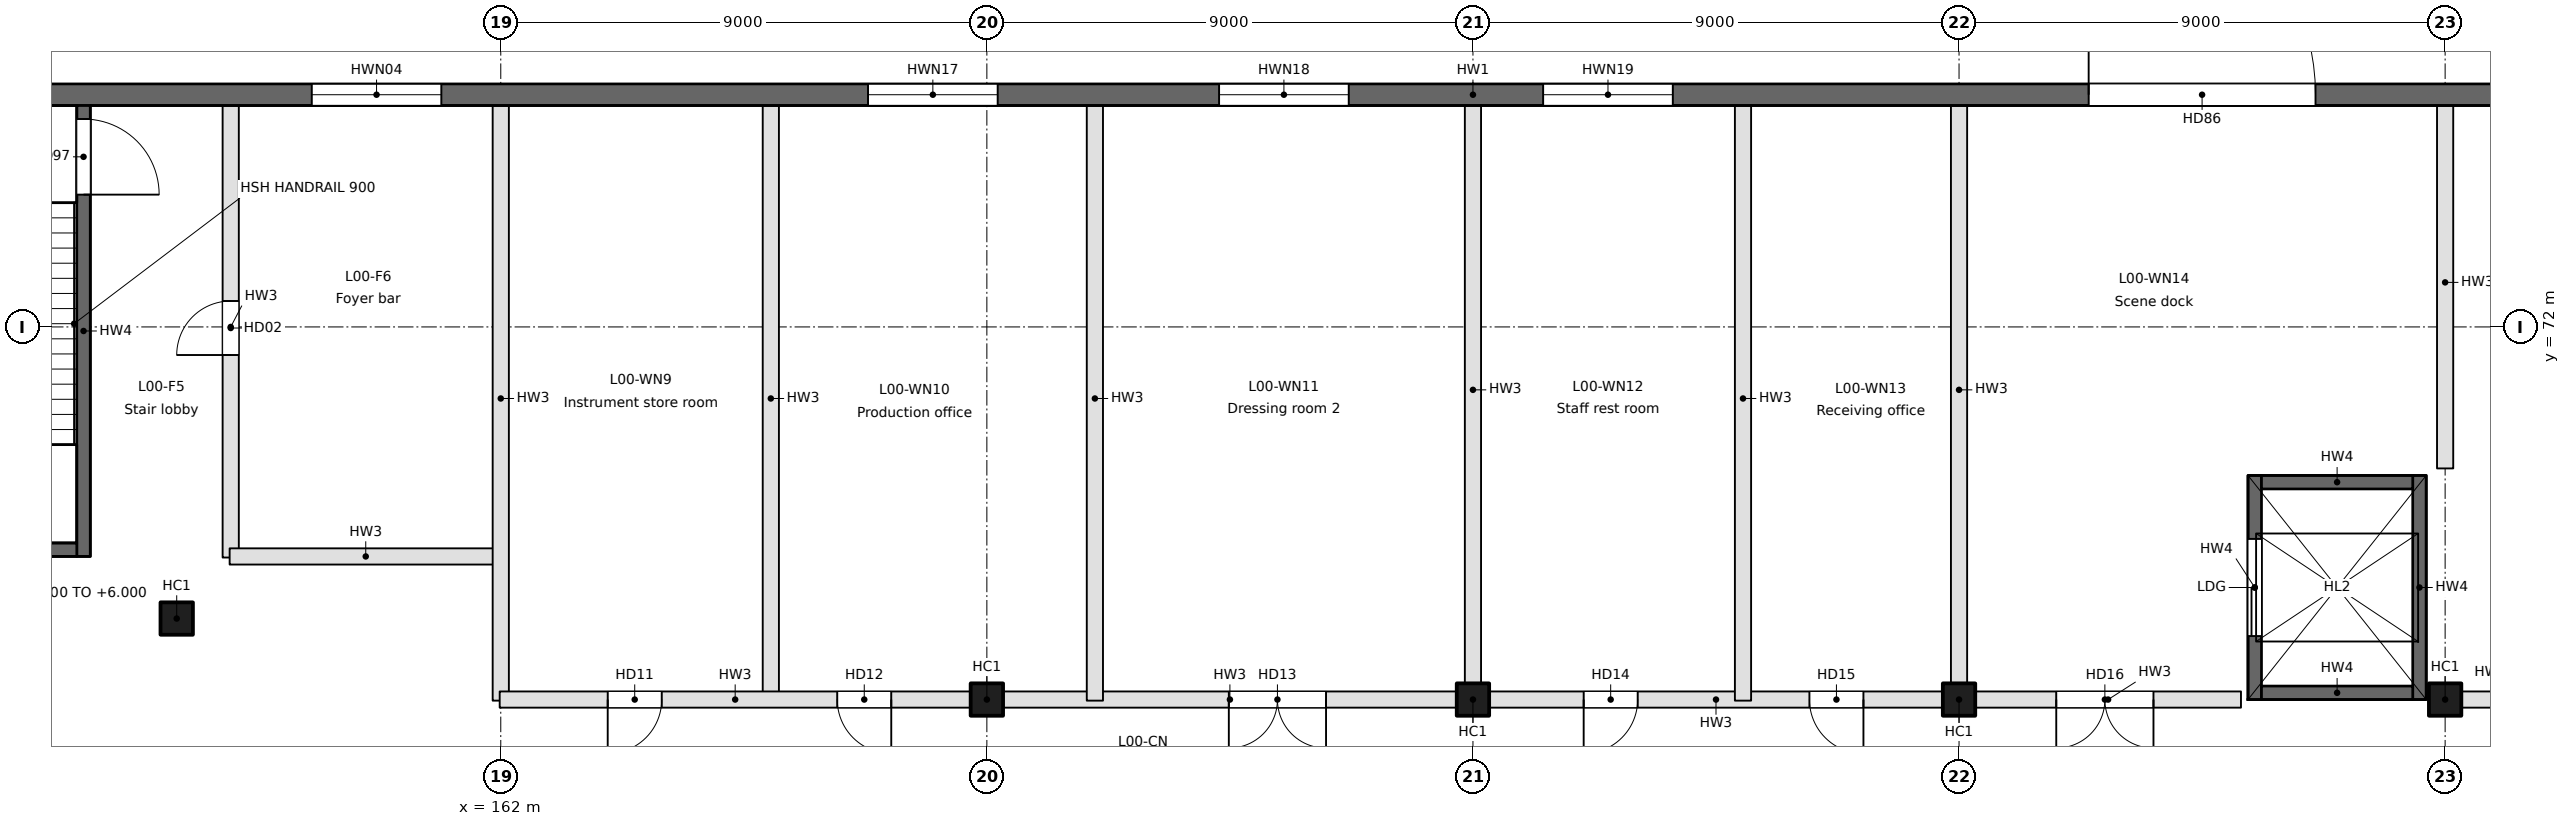
"""IFC4 building model, lengths in metres.
Left out: names, types, materials, properties, quantities, classifications, styles, units other than length and angle.
Written with IfcOpenShell. Run it as: python <this file> out.ifc"""

import sys

from ifc_helpers import new_model, si_unit, direction, frame, frame_2d, origin, origin_2d, place, context, subcontext, project, spatial, rectangle, extrude, element, fill, save


model = new_model("IFC4")
c1 = context("Model", 3, precision=1e-05, world=origin(), true_north=direction((0.0, 1.0)))
c2 = subcontext(c1, "Body", "Model", "MODEL_VIEW")
j1 = project(units=[si_unit("LENGTHUNIT", "METRE"), si_unit("PLANEANGLEUNIT", "RADIAN")], contexts=[c1])
p1 = place(None, origin())
s1 = spatial("IfcSite", under=j1, at=p1, CompositionType="ELEMENT")
p2 = place(p1, origin())
s2 = spatial("IfcBuilding", under=s1, at=p2, CompositionType="ELEMENT")
p3 = place(p2, origin())
s3 = spatial("IfcBuildingStorey", under=s2, at=p3, CompositionType="ELEMENT", Elevation=0.0)
for number, where, z_axis, x_axis in (
    (1, (171.0, 65.1, -1.8), (0.0, 0.0, 1.0), (1.0, 0.0, 0.0)),
    (2, (180.0, 65.1, -1.8), (0.0, 0.0, 1.0), (1.0, 0.0, 0.0)),
    (3, (189.0, 65.1, -1.8), (0.0, 0.0, 1.0), (1.0, 0.0, 0.0)),
    (4, (198.0, 65.1, -1.8), (0.0, 0.0, 1.0), (1.0, 0.0, 0.0)),
    (5, (156.0, 66.6, -1.8), (0.0, 0.0, 1.0), (1.0, 0.0, 0.0)),
):
    element("IfcColumn", number, at=place(p3, frame(where, z_axis=z_axis, x_axis=x_axis)), inside=s3, PredefinedType="COLUMN", context=c2, shape_type="SweptSolid", body=[
        extrude(rectangle(XDim=0.6, YDim=0.6, at=origin_2d()), origin(), (0.0, 0.0, 1.0), 7.8),
    ])
p4 = place(p3, frame((150.4, 76.3, -1.8), z_axis=(0.0, 0.0, 1.0), x_axis=(1.0, 0.0, 0.0)))
e6 = element("IfcWall", 6, at=p4, inside=s3, PredefinedType="SOLIDWALL", context=c2, shape_type="SweptSolid", body=[
    extrude(rectangle(XDim=59.2, YDim=0.4, at=frame_2d((29.6, 0.0))), origin(), (0.0, 0.0, 1.0), 7.45),
])
p5 = place(p4, frame((0.875, 0.0, 1.8)))
e7 = element("IfcOpeningElement", 7, at=p5, cuts=e6, PredefinedType="OPENING", context=c2, shape_type="SweptSolid", body=[
    extrude(rectangle(XDim=2.0, YDim=2.1, at=frame_2d((1.0, 1.05))), frame((0.0, 0.2, 0.0), z_axis=(0.0, -1.0, 0.0), x_axis=(1.0, 0.0, 0.0)), (0.0, 0.0, 1.0), 0.4),
])
p6 = place(p4, frame((41.0, 0.0, 1.8)))
e8 = element("IfcOpeningElement", 8, at=p6, cuts=e6, PredefinedType="OPENING", context=c2, shape_type="SweptSolid", body=[
    extrude(rectangle(XDim=4.2, YDim=4.2, at=frame_2d((2.1, 2.1))), frame((0.0, 0.2, 0.0), z_axis=(0.0, -1.0, 0.0), x_axis=(1.0, 0.0, 0.0)), (0.0, 0.0, 1.0), 0.4),
])
p7 = place(p4, frame((52.9, 0.0, 1.8)))
e9 = element("IfcOpeningElement", 9, at=p7, cuts=e6, PredefinedType="OPENING", context=c2, shape_type="SweptSolid", body=[
    extrude(rectangle(XDim=1.4, YDim=2.1, at=frame_2d((0.7, 1.05))), frame((0.0, 0.2, 0.0), z_axis=(0.0, -1.0, 0.0), x_axis=(1.0, 0.0, 0.0)), (0.0, 0.0, 1.0), 0.4),
])
p8 = place(p4, frame((8.1, 0.0, 2.7)))
e10 = element("IfcOpeningElement", 10, at=p8, cuts=e6, PredefinedType="OPENING", context=c2, shape_type="SweptSolid", body=[
    extrude(rectangle(XDim=2.4, YDim=1.8, at=frame_2d((1.2, 0.9))), frame((0.0, 0.2, 0.0), z_axis=(0.0, -1.0, 0.0), x_axis=(1.0, 0.0, 0.0)), (0.0, 0.0, 1.0), 0.4),
])
p9 = place(p4, frame((18.4, 0.0, 2.7)))
e11 = element("IfcOpeningElement", 11, at=p9, cuts=e6, PredefinedType="OPENING", context=c2, shape_type="SweptSolid", body=[
    extrude(rectangle(XDim=2.4, YDim=1.8, at=frame_2d((1.2, 0.9))), frame((0.0, 0.2, 0.0), z_axis=(0.0, -1.0, 0.0), x_axis=(1.0, 0.0, 0.0)), (0.0, 0.0, 1.0), 0.4),
])
p10 = place(p4, frame((24.9, 0.0, 2.7)))
e12 = element("IfcOpeningElement", 12, at=p10, cuts=e6, PredefinedType="OPENING", context=c2, shape_type="SweptSolid", body=[
    extrude(rectangle(XDim=2.4, YDim=1.8, at=frame_2d((1.2, 0.9))), frame((0.0, 0.2, 0.0), z_axis=(0.0, -1.0, 0.0), x_axis=(1.0, 0.0, 0.0)), (0.0, 0.0, 1.0), 0.4),
])
p11 = place(p4, frame((30.9, 0.0, 2.7)))
e13 = element("IfcOpeningElement", 13, at=p11, cuts=e6, PredefinedType="OPENING", context=c2, shape_type="SweptSolid", body=[
    extrude(rectangle(XDim=2.4, YDim=1.8, at=frame_2d((1.2, 0.9))), frame((0.0, 0.2, 0.0), z_axis=(0.0, -1.0, 0.0), x_axis=(1.0, 0.0, 0.0)), (0.0, 0.0, 1.0), 0.4),
])
p12 = place(p3, frame((157.0, 67.73, 0.0), z_axis=(0.0, 0.0, 1.0), x_axis=(0.0, 1.0, 0.0)))
e14 = element("IfcWall", 14, at=p12, inside=s3, PredefinedType="PARTITIONING", context=c2, shape_type="SweptSolid", body=[
    extrude(rectangle(XDim=8.54, YDim=0.3, at=frame_2d((4.27, 0.0))), origin(), (0.0, 0.0, 1.0), 5.65),
])
p13 = place(p12, frame((3.75, 0.0, 0.0)))
e15 = element("IfcOpeningElement", 15, at=p13, cuts=e14, PredefinedType="OPENING", context=c2, shape_type="SweptSolid", body=[
    extrude(rectangle(XDim=1.0, YDim=2.1, at=frame_2d((0.5, 1.05))), frame((0.0, 0.15, 0.0), z_axis=(0.0, -1.0, 0.0), x_axis=(1.0, 0.0, 0.0)), (0.0, 0.0, 1.0), 0.3),
])
p14 = place(p3, frame((162.02, 67.75, 0.0), z_axis=(0.0, 0.0, 1.0), x_axis=(-1.0, 0.0, 0.0)))
e16 = element("IfcWall", 16, at=p14, inside=s3, PredefinedType="PARTITIONING", context=c2, shape_type="SweptSolid", body=[
    extrude(rectangle(XDim=5.04, YDim=0.3, at=frame_2d((2.52, 0.0))), origin(), (0.0, 0.0, 1.0), 5.65),
])
p15 = place(p3, frame((162.0, 65.08, 0.0), z_axis=(0.0, 0.0, 1.0), x_axis=(0.0, 1.0, 0.0)))
e17 = element("IfcWall", 17, at=p15, inside=s3, PredefinedType="PARTITIONING", context=c2, shape_type="SweptSolid", body=[
    extrude(rectangle(XDim=11.19, YDim=0.3, at=frame_2d((5.595, 0.0))), origin(), (0.0, 0.0, 1.0), 5.65),
])
p16 = place(p3, frame((198.0, 69.38, 0.0), z_axis=(0.0, 0.0, 1.0), x_axis=(0.0, 1.0, 0.0)))
e18 = element("IfcWall", 18, at=p16, inside=s3, PredefinedType="PARTITIONING", context=c2, shape_type="SweptSolid", body=[
    extrude(rectangle(XDim=6.89, YDim=0.3, at=frame_2d((3.445, 0.0))), origin(), (0.0, 0.0, 1.0), 5.65),
])
p17 = place(p3, frame((167.0, 65.08, 0.0), z_axis=(0.0, 0.0, 1.0), x_axis=(0.0, 1.0, 0.0)))
e19 = element("IfcWall", 19, at=p17, inside=s3, PredefinedType="PARTITIONING", context=c2, shape_type="SweptSolid", body=[
    extrude(rectangle(XDim=11.19, YDim=0.3, at=frame_2d((5.595, 0.0))), origin(), (0.0, 0.0, 1.0), 5.65),
])
p18 = place(p3, frame((170.7, 65.1, 0.0), z_axis=(0.0, 0.0, 1.0), x_axis=(-1.0, 0.0, 0.0)))
e20 = element("IfcWall", 20, at=p18, inside=s3, PredefinedType="PARTITIONING", context=c2, shape_type="SweptSolid", body=[
    extrude(rectangle(XDim=8.72, YDim=0.3, at=frame_2d((4.36, 0.0))), origin(), (0.0, 0.0, 1.0), 5.65),
])
p19 = place(p18, frame((5.72, 0.0, 0.0)))
e21 = element("IfcOpeningElement", 21, at=p19, cuts=e20, PredefinedType="OPENING", context=c2, shape_type="SweptSolid", body=[
    extrude(rectangle(XDim=1.0, YDim=2.1, at=frame_2d((0.5, 1.05))), frame((0.0, 0.15, 0.0), z_axis=(0.0, -1.0, 0.0), x_axis=(1.0, 0.0, 0.0)), (0.0, 0.0, 1.0), 0.3),
])
p20 = place(p18, frame((1.47, 0.0, 0.0)))
e22 = element("IfcOpeningElement", 22, at=p20, cuts=e20, PredefinedType="OPENING", context=c2, shape_type="SweptSolid", body=[
    extrude(rectangle(XDim=1.0, YDim=2.1, at=frame_2d((0.5, 1.05))), frame((0.0, 0.15, 0.0), z_axis=(0.0, -1.0, 0.0), x_axis=(1.0, 0.0, 0.0)), (0.0, 0.0, 1.0), 0.3),
])
p21 = place(p3, frame((179.7, 65.1, 0.0), z_axis=(0.0, 0.0, 1.0), x_axis=(-1.0, 0.0, 0.0)))
e23 = element("IfcWall", 23, at=p21, inside=s3, PredefinedType="PARTITIONING", context=c2, shape_type="SweptSolid", body=[
    extrude(rectangle(XDim=8.4, YDim=0.3, at=frame_2d((4.2, 0.0))), origin(), (0.0, 0.0, 1.0), 5.65),
])
p22 = place(p21, frame((2.42, 0.0, 0.0)))
e24 = element("IfcOpeningElement", 24, at=p22, cuts=e23, PredefinedType="OPENING", context=c2, shape_type="SweptSolid", body=[
    extrude(rectangle(XDim=1.8, YDim=2.1, at=frame_2d((0.9, 1.05))), frame((0.0, 0.15, 0.0), z_axis=(0.0, -1.0, 0.0), x_axis=(1.0, 0.0, 0.0)), (0.0, 0.0, 1.0), 0.3),
])
p23 = place(p3, frame((188.7, 65.1, 0.0), z_axis=(0.0, 0.0, 1.0), x_axis=(-1.0, 0.0, 0.0)))
e25 = element("IfcWall", 25, at=p23, inside=s3, PredefinedType="PARTITIONING", context=c2, shape_type="SweptSolid", body=[
    extrude(rectangle(XDim=8.4, YDim=0.3, at=frame_2d((4.2, 0.0))), origin(), (0.0, 0.0, 1.0), 5.65),
])
p24 = place(p23, frame((5.65, 0.0, 0.0)))
e26 = element("IfcOpeningElement", 26, at=p24, cuts=e25, PredefinedType="OPENING", context=c2, shape_type="SweptSolid", body=[
    extrude(rectangle(XDim=1.0, YDim=2.1, at=frame_2d((0.5, 1.05))), frame((0.0, 0.15, 0.0), z_axis=(0.0, -1.0, 0.0), x_axis=(1.0, 0.0, 0.0)), (0.0, 0.0, 1.0), 0.3),
])
p25 = place(p23, frame((1.47, 0.0, 0.0)))
e27 = element("IfcOpeningElement", 27, at=p25, cuts=e25, PredefinedType="OPENING", context=c2, shape_type="SweptSolid", body=[
    extrude(rectangle(XDim=1.0, YDim=2.1, at=frame_2d((0.5, 1.05))), frame((0.0, 0.15, 0.0), z_axis=(0.0, -1.0, 0.0), x_axis=(1.0, 0.0, 0.0)), (0.0, 0.0, 1.0), 0.3),
])
p26 = place(p3, frame((194.22, 65.1, 0.0), z_axis=(0.0, 0.0, 1.0), x_axis=(-1.0, 0.0, 0.0)))
e28 = element("IfcWall", 28, at=p26, inside=s3, PredefinedType="PARTITIONING", context=c2, shape_type="SweptSolid", body=[
    extrude(rectangle(XDim=4.92, YDim=0.3, at=frame_2d((2.46, 0.0))), origin(), (0.0, 0.0, 1.0), 5.65),
])
p27 = place(p26, frame((1.62, 0.0, 0.0)))
e29 = element("IfcOpeningElement", 29, at=p27, cuts=e28, PredefinedType="OPENING", context=c2, shape_type="SweptSolid", body=[
    extrude(rectangle(XDim=1.8, YDim=2.1, at=frame_2d((0.9, 1.05))), frame((0.0, 0.15, 0.0), z_axis=(0.0, -1.0, 0.0), x_axis=(1.0, 0.0, 0.0)), (0.0, 0.0, 1.0), 0.3),
])
p28 = place(p3, frame((201.12, 65.1, 0.0), z_axis=(0.0, 0.0, 1.0), x_axis=(-1.0, 0.0, 0.0)))
e30 = element("IfcWall", 30, at=p28, inside=s3, PredefinedType="PARTITIONING", context=c2, shape_type="SweptSolid", body=[
    extrude(rectangle(XDim=2.82, YDim=0.3, at=frame_2d((1.41, 0.0))), origin(), (0.0, 0.0, 1.0), 5.65),
])
p29 = place(p28, frame((0.82, 0.0, 0.0)))
e31 = element("IfcOpeningElement", 31, at=p29, cuts=e30, PredefinedType="OPENING", context=c2, shape_type="SweptSolid", body=[
    extrude(rectangle(XDim=1.0, YDim=2.1, at=frame_2d((0.5, 1.05))), frame((0.0, 0.15, 0.0), z_axis=(0.0, -1.0, 0.0), x_axis=(1.0, 0.0, 0.0)), (0.0, 0.0, 1.0), 0.3),
])
p30 = place(p3, frame((173.0, 65.08, 0.0), z_axis=(0.0, 0.0, 1.0), x_axis=(0.0, 1.0, 0.0)))
e32 = element("IfcWall", 32, at=p30, inside=s3, PredefinedType="PARTITIONING", context=c2, shape_type="SweptSolid", body=[
    extrude(rectangle(XDim=11.19, YDim=0.3, at=frame_2d((5.595, 0.0))), origin(), (0.0, 0.0, 1.0), 5.65),
])
p31 = place(p3, frame((180.0, 65.4, 0.0), z_axis=(0.0, 0.0, 1.0), x_axis=(0.0, 1.0, 0.0)))
e33 = element("IfcWall", 33, at=p31, inside=s3, PredefinedType="PARTITIONING", context=c2, shape_type="SweptSolid", body=[
    extrude(rectangle(XDim=10.87, YDim=0.3, at=frame_2d((5.435, 0.0))), origin(), (0.0, 0.0, 1.0), 5.65),
])
p32 = place(p3, frame((185.0, 65.08, 0.0), z_axis=(0.0, 0.0, 1.0), x_axis=(0.0, 1.0, 0.0)))
e34 = element("IfcWall", 34, at=p32, inside=s3, PredefinedType="PARTITIONING", context=c2, shape_type="SweptSolid", body=[
    extrude(rectangle(XDim=11.19, YDim=0.3, at=frame_2d((5.595, 0.0))), origin(), (0.0, 0.0, 1.0), 5.65),
])
p33 = place(p3, frame((189.0, 65.4, 0.0), z_axis=(0.0, 0.0, 1.0), x_axis=(0.0, 1.0, 0.0)))
e35 = element("IfcWall", 35, at=p33, inside=s3, PredefinedType="PARTITIONING", context=c2, shape_type="SweptSolid", body=[
    extrude(rectangle(XDim=10.87, YDim=0.3, at=frame_2d((5.435, 0.0))), origin(), (0.0, 0.0, 1.0), 5.65),
])
p34 = place(p3, frame((154.275, 76.1, -1.8), z_axis=(0.0, 0.0, 1.0), x_axis=(0.0, -1.0, 0.0)))
e36 = element("IfcWall", 36, at=p34, inside=s3, PredefinedType="SOLIDWALL", context=c2, shape_type="SweptSolid", body=[
    extrude(rectangle(XDim=8.35, YDim=0.25, at=frame_2d((4.175, 0.0))), origin(), (0.0, 0.0, 1.0), 7.45),
])
p35 = place(p34, frame((0.25, 0.0, 1.8)))
e37 = element("IfcOpeningElement", 37, at=p35, cuts=e36, PredefinedType="OPENING", context=c2, shape_type="SweptSolid", body=[
    extrude(rectangle(XDim=1.4, YDim=2.1, at=frame_2d((0.7, 1.05))), frame((0.0, 0.125, 0.0), z_axis=(0.0, -1.0, 0.0), x_axis=(1.0, 0.0, 0.0)), (0.0, 0.0, 1.0), 0.25),
])
p36 = place(p3, frame((154.15, 67.875, -1.8), z_axis=(0.0, 0.0, 1.0), x_axis=(-1.0, 0.0, 0.0)))
e38 = element("IfcWall", 38, at=p36, inside=s3, PredefinedType="SOLIDWALL", context=c2, shape_type="SweptSolid", body=[
    extrude(rectangle(XDim=3.75, YDim=0.25, at=frame_2d((1.875, 0.0))), origin(), (0.0, 0.0, 1.0), 7.45),
])
p37 = place(p3, frame((194.475, 65.1, -1.8), z_axis=(0.0, 0.0, 1.0), x_axis=(0.0, 1.0, 0.0)))
e39 = element("IfcWall", 39, at=p37, inside=s3, PredefinedType="SOLIDWALL", context=c2, shape_type="SweptSolid", body=[
    extrude(rectangle(XDim=4.15, YDim=0.25, at=frame_2d((2.075, 0.0))), origin(), (0.0, 0.0, 1.0), 7.45),
])
p38 = place(p37, frame((1.175, 0.0, 1.8)))
e40 = element("IfcOpeningElement", 40, at=p38, cuts=e39, PredefinedType="OPENING", context=c2, shape_type="SweptSolid", body=[
    extrude(rectangle(XDim=1.8, YDim=2.4, at=frame_2d((0.9, 1.2))), frame((0.0, 0.125, 0.0), z_axis=(0.0, -1.0, 0.0), x_axis=(1.0, 0.0, 0.0)), (0.0, 0.0, 1.0), 0.25),
])
p39 = place(p3, frame((197.525, 69.25, -1.8), z_axis=(0.0, 0.0, 1.0), x_axis=(0.0, -1.0, 0.0)))
e41 = element("IfcWall", 41, at=p39, inside=s3, PredefinedType="SOLIDWALL", context=c2, shape_type="SweptSolid", body=[
    extrude(rectangle(XDim=4.15, YDim=0.25, at=frame_2d((2.075, 0.0))), origin(), (0.0, 0.0, 1.0), 7.45),
])
for number, where, z_axis, x_axis in (
    (42, (197.4, 65.225, -1.8), (0.0, 0.0, 1.0), (-1.0, 0.0, 0.0)),
    (43, (194.6, 69.125, -1.8), (0.0, 0.0, 1.0), (1.0, 0.0, 0.0)),
):
    element("IfcWall", number, at=place(p3, frame(where, z_axis=z_axis, x_axis=x_axis)), inside=s3, PredefinedType="SOLIDWALL", context=c2, shape_type="SweptSolid", body=[
        extrude(rectangle(XDim=2.8, YDim=0.25, at=frame_2d((1.4, 0.0))), origin(), (0.0, 0.0, 1.0), 7.45),
    ])
p40 = place(p13, origin())
e44 = element("IfcDoor", 44, at=p40, inside=s3, OperationType="SINGLE_SWING_LEFT", PredefinedType="DOOR", context=c2, shape_type="SweptSolid", body=[
    extrude(rectangle(XDim=1.0, YDim=2.1, at=frame_2d((0.5, 1.05))), frame((0.0, 0.025, 0.0), z_axis=(0.0, -1.0, 0.0), x_axis=(1.0, 0.0, 0.0)), (0.0, 0.0, 1.0), 0.05),
])
fill(e15, e44)
p41 = place(p19, origin())
e45 = element("IfcDoor", 45, at=p41, inside=s3, OperationType="SINGLE_SWING_RIGHT", PredefinedType="DOOR", context=c2, shape_type="SweptSolid", body=[
    extrude(rectangle(XDim=1.0, YDim=2.1, at=frame_2d((0.5, 1.05))), frame((0.0, 0.025, 0.0), z_axis=(0.0, -1.0, 0.0), x_axis=(1.0, 0.0, 0.0)), (0.0, 0.0, 1.0), 0.05),
])
fill(e21, e45)
p42 = place(p20, origin())
e46 = element("IfcDoor", 46, at=p42, inside=s3, OperationType="SINGLE_SWING_LEFT", PredefinedType="DOOR", context=c2, shape_type="SweptSolid", body=[
    extrude(rectangle(XDim=1.0, YDim=2.1, at=frame_2d((0.5, 1.05))), frame((0.0, 0.025, 0.0), z_axis=(0.0, -1.0, 0.0), x_axis=(1.0, 0.0, 0.0)), (0.0, 0.0, 1.0), 0.05),
])
fill(e22, e46)
p43 = place(p22, origin())
e47 = element("IfcDoor", 47, at=p43, inside=s3, OperationType="DOUBLE_DOOR_SINGLE_SWING", PredefinedType="DOOR", context=c2, shape_type="SweptSolid", body=[
    extrude(rectangle(XDim=1.8, YDim=2.1, at=frame_2d((0.9, 1.05))), frame((0.0, 0.025, 0.0), z_axis=(0.0, -1.0, 0.0), x_axis=(1.0, 0.0, 0.0)), (0.0, 0.0, 1.0), 0.05),
])
fill(e24, e47)
p44 = place(p24, origin())
e48 = element("IfcDoor", 48, at=p44, inside=s3, OperationType="SINGLE_SWING_RIGHT", PredefinedType="DOOR", context=c2, shape_type="SweptSolid", body=[
    extrude(rectangle(XDim=1.0, YDim=2.1, at=frame_2d((0.5, 1.05))), frame((0.0, 0.025, 0.0), z_axis=(0.0, -1.0, 0.0), x_axis=(1.0, 0.0, 0.0)), (0.0, 0.0, 1.0), 0.05),
])
fill(e26, e48)
p45 = place(p25, origin())
e49 = element("IfcDoor", 49, at=p45, inside=s3, OperationType="SINGLE_SWING_LEFT", PredefinedType="DOOR", context=c2, shape_type="SweptSolid", body=[
    extrude(rectangle(XDim=1.0, YDim=2.1, at=frame_2d((0.5, 1.05))), frame((0.0, 0.025, 0.0), z_axis=(0.0, -1.0, 0.0), x_axis=(1.0, 0.0, 0.0)), (0.0, 0.0, 1.0), 0.05),
])
fill(e27, e49)
p46 = place(p27, origin())
e50 = element("IfcDoor", 50, at=p46, inside=s3, OperationType="DOUBLE_DOOR_SINGLE_SWING", PredefinedType="DOOR", context=c2, shape_type="SweptSolid", body=[
    extrude(rectangle(XDim=1.8, YDim=2.1, at=frame_2d((0.9, 1.05))), frame((0.0, 0.025, 0.0), z_axis=(0.0, -1.0, 0.0), x_axis=(1.0, 0.0, 0.0)), (0.0, 0.0, 1.0), 0.05),
])
fill(e29, e50)
p47 = place(p6, origin())
e51 = element("IfcDoor", 51, at=p47, inside=s3, OperationType="ROLLINGUP", PredefinedType="DOOR", context=c2, shape_type="SweptSolid", body=[
    extrude(rectangle(XDim=4.2, YDim=4.2, at=frame_2d((2.1, 2.1))), frame((0.0, 0.025, 0.0), z_axis=(0.0, -1.0, 0.0), x_axis=(1.0, 0.0, 0.0)), (0.0, 0.0, 1.0), 0.05),
])
fill(e8, e51)
p48 = place(p8, origin())
e52 = element("IfcWindow", 52, at=p48, inside=s3, PartitioningType="SINGLE_PANEL", PredefinedType="WINDOW", context=c2, shape_type="SweptSolid", body=[
    extrude(rectangle(XDim=2.4, YDim=1.8, at=frame_2d((1.2, 0.9))), frame((0.0, 0.03, 0.0), z_axis=(0.0, -1.0, 0.0), x_axis=(1.0, 0.0, 0.0)), (0.0, 0.0, 1.0), 0.06),
])
fill(e10, e52)
p49 = place(p9, origin())
e53 = element("IfcWindow", 53, at=p49, inside=s3, PartitioningType="SINGLE_PANEL", PredefinedType="WINDOW", context=c2, shape_type="SweptSolid", body=[
    extrude(rectangle(XDim=2.4, YDim=1.8, at=frame_2d((1.2, 0.9))), frame((0.0, 0.03, 0.0), z_axis=(0.0, -1.0, 0.0), x_axis=(1.0, 0.0, 0.0)), (0.0, 0.0, 1.0), 0.06),
])
fill(e11, e53)
p50 = place(p10, origin())
e54 = element("IfcWindow", 54, at=p50, inside=s3, PartitioningType="SINGLE_PANEL", PredefinedType="WINDOW", context=c2, shape_type="SweptSolid", body=[
    extrude(rectangle(XDim=2.4, YDim=1.8, at=frame_2d((1.2, 0.9))), frame((0.0, 0.03, 0.0), z_axis=(0.0, -1.0, 0.0), x_axis=(1.0, 0.0, 0.0)), (0.0, 0.0, 1.0), 0.06),
])
fill(e12, e54)
p51 = place(p11, origin())
e55 = element("IfcWindow", 55, at=p51, inside=s3, PartitioningType="SINGLE_PANEL", PredefinedType="WINDOW", context=c2, shape_type="SweptSolid", body=[
    extrude(rectangle(XDim=2.4, YDim=1.8, at=frame_2d((1.2, 0.9))), frame((0.0, 0.03, 0.0), z_axis=(0.0, -1.0, 0.0), x_axis=(1.0, 0.0, 0.0)), (0.0, 0.0, 1.0), 0.06),
])
fill(e13, e55)
p52 = place(p35, origin())
e56 = element("IfcDoor", 56, at=p52, inside=s3, OperationType="SINGLE_SWING_RIGHT", PredefinedType="DOOR", context=c2, shape_type="SweptSolid", body=[
    extrude(rectangle(XDim=1.4, YDim=2.1, at=frame_2d((0.7, 1.05))), frame((0.0, 0.025, 0.0), z_axis=(0.0, -1.0, 0.0), x_axis=(1.0, 0.0, 0.0)), (0.0, 0.0, 1.0), 0.05),
])
fill(e37, e56)
p53 = place(p38, origin())
e57 = element("IfcDoor", 57, at=p53, inside=s3, OperationType="SLIDING_TO_RIGHT", PredefinedType="DOOR", context=c2, shape_type="SweptSolid", body=[
    extrude(rectangle(XDim=1.8, YDim=2.4, at=frame_2d((0.9, 1.2))), frame((0.0, 0.025, 0.0), z_axis=(0.0, -1.0, 0.0), x_axis=(1.0, 0.0, 0.0)), (0.0, 0.0, 1.0), 0.05),
])
fill(e40, e57)
save(model, sys.argv[1])
